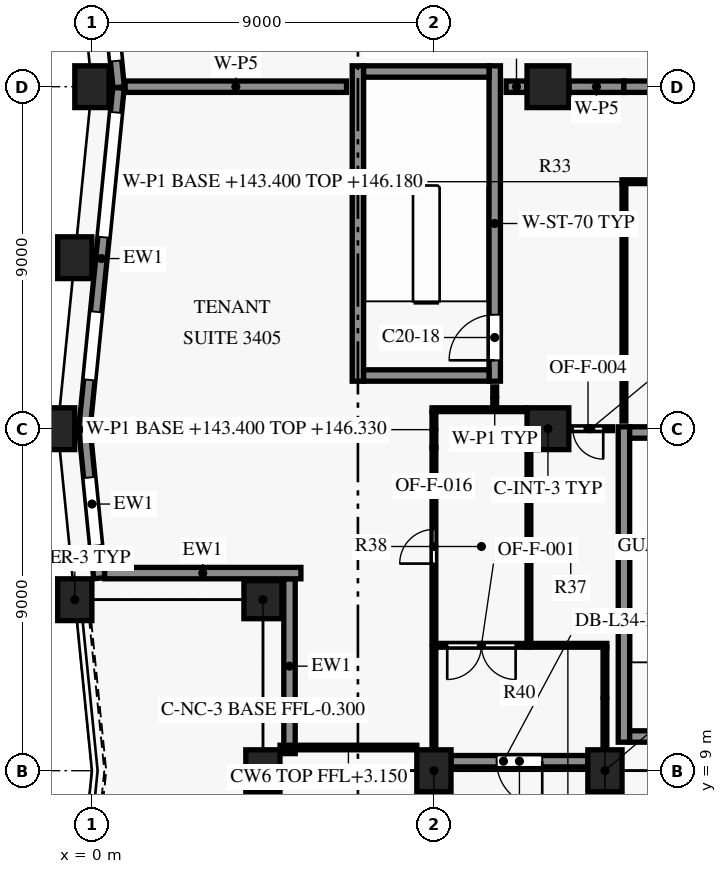
"""IFC4 building model, lengths in metres.
Left out: names, types, materials, properties, quantities, classifications, styles, units other than length and angle.
Written with IfcOpenShell. Run it as: python <this file> out.ifc"""

import sys

from ifc_helpers import new_model, si_unit, direction, frame, frame_2d, origin, origin_2d, place, context, subcontext, project, spatial, rectangle, extrude, element, fill, save


model = new_model("IFC4")
c1 = context("Model", 3, precision=1e-05, world=origin(), true_north=direction((0.0, 1.0)))
c2 = subcontext(c1, "Body", "Model", "MODEL_VIEW")
j1 = project(units=[si_unit("LENGTHUNIT", "METRE"), si_unit("PLANEANGLEUNIT", "RADIAN")], contexts=[c1])
p1 = place(None, origin())
s1 = spatial("IfcSite", under=j1, at=p1, CompositionType="ELEMENT")
p2 = place(p1, origin())
s2 = spatial("IfcBuilding", under=s1, at=p2, CompositionType="ELEMENT")
p3 = place(p2, frame((0.0, 0.0, 143.4)))
s3 = spatial("IfcBuildingStorey", under=s2, at=p3, CompositionType="ELEMENT", Elevation=143.4)
for number, where, z_axis, x_axis in (
    (1, (4.5, 9.0, -0.3), (0.0, 0.0, 1.0), (1.0, 0.0, 0.0)),
    (2, (9.0, 9.0, -0.3), (0.0, 0.0, 1.0), (1.0, 0.0, 0.0)),
    (3, (13.5, 9.0, -0.3), (0.0, 0.0, 1.0), (1.0, 0.0, 0.0)),
):
    element("IfcColumn", number, at=place(p3, frame(where, z_axis=z_axis, x_axis=x_axis)), inside=s3, PredefinedType="COLUMN", context=c2, shape_type="SweptSolid", body=[
        extrude(rectangle(XDim=0.9, YDim=1.1, at=origin_2d()), origin(), (0.0, 0.0, 1.0), 4.1),
    ])
for number, where, z_axis, x_axis in (
    (4, (0.0, 27.0, 0.0), (0.0, 0.0, 1.0), (0.0, -1.0, 0.0)),
    (5, (-0.45, 22.5, 0.0), (0.0, 0.0, 1.0), (-0.1, -0.995, 0.0)),
    (6, (-0.9, 18.0, 0.0), (0.0, 0.0, 1.0), (0.0, -1.0, 0.0)),
    (7, (-0.45, 13.5, 0.0), (0.0, 0.0, 1.0), (0.1, -0.995, 0.0)),
):
    element("IfcColumn", number, at=place(p3, frame(where, z_axis=z_axis, x_axis=x_axis)), inside=s3, PredefinedType="COLUMN", context=c2, shape_type="SweptSolid", body=[
        extrude(rectangle(XDim=0.9, YDim=1.1, at=origin_2d()), origin(), (0.0, 0.0, 1.0), 3.8),
    ])
p4 = place(p3, frame((4.5, 13.5, -0.3), z_axis=(0.0, 0.0, 1.0), x_axis=(1.0, 0.0, 0.0)))
e8 = element("IfcColumn", 8, at=p4, inside=s3, PredefinedType="COLUMN", context=c2, shape_type="SweptSolid", body=[
    extrude(rectangle(XDim=1.0, YDim=1.0, at=origin_2d()), origin(), (0.0, 0.0, 1.0), 4.1),
])
for number, where, z_axis, x_axis in (
    (9, (12.0, 18.0, 0.0), (0.0, 0.0, 1.0), (1.0, 0.0, 0.0)),
    (10, (12.0, 27.0, 0.0), (0.0, 0.0, 1.0), (1.0, 0.0, 0.0)),
):
    element("IfcColumn", number, at=place(p3, frame(where, z_axis=z_axis, x_axis=x_axis)), inside=s3, PredefinedType="COLUMN", context=c2, shape_type="SweptSolid", body=[
        extrude(rectangle(XDim=1.1, YDim=1.1, at=origin_2d()), origin(), (0.0, 0.0, 1.0), 3.8),
    ])
p5 = place(p3, frame((0.705, 26.985, 0.0), z_axis=(0.0, 0.0, 1.0), x_axis=(-0.099533329093, 0.995034228758, 0.0)))
e11 = element("IfcWall", 11, at=p5, inside=s3, PredefinedType="SOLIDWALL", context=c2, shape_type="SweptSolid", body=[
    extrude(rectangle(XDim=8.98, YDim=0.3, at=frame_2d((4.49, 0.0))), origin(), (0.0, 0.0, 1.0), 3.15),
])
p6 = place(p5, frame((0.696, 0.0, 0.15)))
e12 = element("IfcOpeningElement", 12, at=p6, cuts=e11, PredefinedType="OPENING", context=c2, shape_type="SweptSolid", body=[
    extrude(rectangle(XDim=3.3, YDim=2.4, at=frame_2d((1.65, 1.2))), frame((0.0, 0.16, 0.0), z_axis=(0.0, -1.0, 0.0), x_axis=(1.0, 0.0, 0.0)), (0.0, 0.0, 1.0), 0.32),
])
p7 = place(p5, frame((5.969, 0.0, 0.75)))
e13 = element("IfcOpeningElement", 13, at=p7, cuts=e11, PredefinedType="OPENING", context=c2, shape_type="SweptSolid", body=[
    extrude(rectangle(XDim=1.8, YDim=1.8, at=frame_2d((0.9, 0.9))), frame((0.0, 0.16, 0.0), z_axis=(0.0, -1.0, 0.0), x_axis=(1.0, 0.0, 0.0)), (0.0, 0.0, 1.0), 0.32),
])
p8 = place(p3, frame((-0.198, 17.985, 0.0), z_axis=(0.0, 0.0, 1.0), x_axis=(0.099495688264, 0.995037993253, 0.0)))
e14 = element("IfcWall", 14, at=p8, inside=s3, PredefinedType="SOLIDWALL", context=c2, shape_type="SweptSolid", body=[
    extrude(rectangle(XDim=9.03, YDim=0.3, at=frame_2d((4.515, 0.0))), origin(), (0.0, 0.0, 1.0), 3.15),
])
p9 = place(p8, frame((1.306, 0.0, 0.75)))
e15 = element("IfcOpeningElement", 15, at=p9, cuts=e14, PredefinedType="OPENING", context=c2, shape_type="SweptSolid", body=[
    extrude(rectangle(XDim=1.8, YDim=1.8, at=frame_2d((0.9, 0.9))), frame((0.0, 0.16, 0.0), z_axis=(0.0, -1.0, 0.0), x_axis=(1.0, 0.0, 0.0)), (0.0, 0.0, 1.0), 0.32),
])
p10 = place(p8, frame((5.079, 0.0, 0.15)))
e16 = element("IfcOpeningElement", 16, at=p10, cuts=e14, PredefinedType="OPENING", context=c2, shape_type="SweptSolid", body=[
    extrude(rectangle(XDim=3.3, YDim=2.4, at=frame_2d((1.65, 1.2))), frame((0.0, 0.16, 0.0), z_axis=(0.0, -1.0, 0.0), x_axis=(1.0, 0.0, 0.0)), (0.0, 0.0, 1.0), 0.32),
])
p11 = place(p3, frame((0.197, 14.065, 0.0), z_axis=(0.0, 0.0, 1.0), x_axis=(-0.099528354722, 0.995034726332, 0.0)))
e17 = element("IfcWall", 17, at=p11, inside=s3, PredefinedType="SOLIDWALL", context=c2, shape_type="SweptSolid", body=[
    extrude(rectangle(XDim=3.925, YDim=0.3, at=frame_2d((1.962, 0.0))), origin(), (0.0, 0.0, 1.0), 3.15),
])
p12 = place(p11, frame((0.864, 0.0, 0.75)))
e18 = element("IfcOpeningElement", 18, at=p12, cuts=e17, PredefinedType="OPENING", context=c2, shape_type="SweptSolid", body=[
    extrude(rectangle(XDim=1.8, YDim=1.8, at=frame_2d((0.9, 0.9))), frame((0.0, 0.16, 0.0), z_axis=(0.0, -1.0, 0.0), x_axis=(1.0, 0.0, 0.0)), (0.0, 0.0, 1.0), 0.32),
])
p13 = place(p3, frame((5.5, 14.2, 0.0), z_axis=(0.0, 0.0, 1.0), x_axis=(-1.0, 0.0, 0.0)))
e19 = element("IfcWall", 19, at=p13, inside=s3, PredefinedType="SOLIDWALL", context=c2, shape_type="SweptSolid", body=[
    extrude(rectangle(XDim=5.165, YDim=0.3, at=frame_2d((2.582, 0.0))), origin(), (0.0, 0.0, 1.0), 3.15),
])
p14 = place(p3, frame((5.2, 9.45, 0.0), z_axis=(0.0, 0.0, 1.0), x_axis=(0.0, 1.0, 0.0)))
e20 = element("IfcWall", 20, at=p14, inside=s3, PredefinedType="SOLIDWALL", context=c2, shape_type="SweptSolid", body=[
    extrude(rectangle(XDim=4.602, YDim=0.3, at=frame_2d((2.301, 0.0))), origin(), (0.0, 0.0, 1.0), 3.15),
])
p15 = place(p3, frame((13.05, 9.25, 0.0), z_axis=(0.0, 0.0, 1.0), x_axis=(-1.0, 0.0, 0.0)))
e21 = element("IfcWall", 21, at=p15, inside=s3, PredefinedType="SOLIDWALL", context=c2, shape_type="SweptSolid", body=[
    extrude(rectangle(XDim=3.6, YDim=0.3, at=frame_2d((1.8, 0.0))), origin(), (0.0, 0.0, 1.0), 3.15),
])
p16 = place(p15, frame((1.2, 0.0, 0.0)))
e22 = element("IfcOpeningElement", 22, at=p16, cuts=e21, PredefinedType="OPENING", context=c2, shape_type="SweptSolid", body=[
    extrude(rectangle(XDim=1.2, YDim=2.5, at=frame_2d((0.6, 1.25))), frame((0.0, 0.16, 0.0), z_axis=(0.0, -1.0, 0.0), x_axis=(1.0, 0.0, 0.0)), (0.0, 0.0, 1.0), 0.32),
])
for number, where, z_axis, x_axis in (
    (23, (14.15, 9.9, 0.0), (0.0, 0.0, 1.0), (1.0, 0.0, 0.0)),
    (24, (14.15, 17.9, 0.0), (0.0, 0.0, 1.0), (1.0, 0.0, 0.0)),
    (25, (7.15, 19.4, 0.0), (0.0, 0.0, 1.0), (1.0, 0.0, 0.0)),
    (26, (7.15, 27.4, 0.0), (0.0, 0.0, 1.0), (1.0, 0.0, 0.0)),
):
    element("IfcWall", number, at=place(p3, frame(where, z_axis=z_axis, x_axis=x_axis)), inside=s3, PredefinedType="SHEAR", context=c2, shape_type="SweptSolid", body=[
        extrude(rectangle(XDim=3.3, YDim=0.3, at=frame_2d((1.65, 0.0))), origin(), (0.0, 0.0, 1.0), 3.5),
    ])
p17 = place(p3, frame((7.0, 19.25, 0.0), z_axis=(0.0, 0.0, 1.0), x_axis=(0.0, 1.0, 0.0)))
e27 = element("IfcWall", 27, at=p17, inside=s3, PredefinedType="SHEAR", context=c2, shape_type="SweptSolid", body=[
    extrude(rectangle(XDim=8.3, YDim=0.3, at=frame_2d((4.15, 0.0))), origin(), (0.0, 0.0, 1.0), 3.5),
])
p18 = place(p3, frame((10.6, 19.25, 0.0), z_axis=(0.0, 0.0, 1.0), x_axis=(0.0, 1.0, 0.0)))
e28 = element("IfcWall", 28, at=p18, inside=s3, PredefinedType="SHEAR", context=c2, shape_type="SweptSolid", body=[
    extrude(rectangle(XDim=8.3, YDim=0.3, at=frame_2d((4.15, 0.0))), origin(), (0.0, 0.0, 1.0), 3.5),
])
p19 = place(p18, frame((0.55, 0.0, 0.0)))
e29 = element("IfcOpeningElement", 29, at=p19, cuts=e28, PredefinedType="OPENING", context=c2, shape_type="SweptSolid", body=[
    extrude(rectangle(XDim=1.2, YDim=2.2, at=frame_2d((0.6, 1.1))), frame((0.0, 0.16, 0.0), z_axis=(0.0, -1.0, 0.0), x_axis=(1.0, 0.0, 0.0)), (0.0, 0.0, 1.0), 0.32),
])
p20 = place(p3, frame((14.0, 9.75, 0.0), z_axis=(0.0, 0.0, 1.0), x_axis=(0.0, 1.0, 0.0)))
e30 = element("IfcWall", 30, at=p20, inside=s3, PredefinedType="SHEAR", context=c2, shape_type="SweptSolid", body=[
    extrude(rectangle(XDim=8.3, YDim=0.3, at=frame_2d((4.15, 0.0))), origin(), (0.0, 0.0, 1.0), 3.5),
])
p21 = place(p3, frame((9.0, 9.57, 0.0), z_axis=(0.0, 0.0, 1.0), x_axis=(0.0, 1.0, 0.0)))
e31 = element("IfcWall", 31, at=p21, inside=s3, PredefinedType="PARTITIONING", context=c2, shape_type="SweptSolid", body=[
    extrude(rectangle(XDim=2.68, YDim=0.1, at=frame_2d((1.34, 0.0))), origin(), (0.0, 0.0, 1.0), 3.48),
])
p22 = place(p3, frame((13.5, 12.25, 0.0), z_axis=(0.0, 0.0, 1.0), x_axis=(0.0, -1.0, 0.0)))
e32 = element("IfcWall", 32, at=p22, inside=s3, PredefinedType="PARTITIONING", context=c2, shape_type="SweptSolid", body=[
    extrude(rectangle(XDim=2.68, YDim=0.1, at=frame_2d((1.34, 0.0))), origin(), (0.0, 0.0, 1.0), 2.78),
])
p23 = place(p3, frame((11.5, 12.3, 0.0), z_axis=(0.0, 0.0, 1.0), x_axis=(-1.0, 0.0, 0.0)))
e33 = element("IfcWall", 33, at=p23, inside=s3, PredefinedType="PARTITIONING", context=c2, shape_type="SweptSolid", body=[
    extrude(rectangle(XDim=2.45, YDim=0.1, at=frame_2d((1.225, 0.0))), origin(), (0.0, 0.0, 1.0), 3.48),
])
p24 = place(p23, frame((0.35, 0.0, 0.0)))
e34 = element("IfcOpeningElement", 34, at=p24, cuts=e33, PredefinedType="OPENING", context=c2, shape_type="SweptSolid", body=[
    extrude(rectangle(XDim=1.8, YDim=2.1, at=frame_2d((0.9, 1.05))), frame((0.0, 0.06, 0.0), z_axis=(0.0, -1.0, 0.0), x_axis=(1.0, 0.0, 0.0)), (0.0, 0.0, 1.0), 0.12),
])
p25 = place(p3, frame((11.5, 12.3, 0.0), z_axis=(0.0, 0.0, 1.0), x_axis=(1.0, 0.0, 0.0)))
e35 = element("IfcWall", 35, at=p25, inside=s3, PredefinedType="PARTITIONING", context=c2, shape_type="SweptSolid", body=[
    extrude(rectangle(XDim=2.05, YDim=0.1, at=frame_2d((1.025, 0.0))), origin(), (0.0, 0.0, 1.0), 2.78),
])
p26 = place(p3, frame((9.0, 12.35, 0.0), z_axis=(0.0, 0.0, 1.0), x_axis=(0.0, 1.0, 0.0)))
e36 = element("IfcWall", 36, at=p26, inside=s3, PredefinedType="PARTITIONING", context=c2, shape_type="SweptSolid", body=[
    extrude(rectangle(XDim=5.15, YDim=0.1, at=frame_2d((2.575, 0.0))), origin(), (0.0, 0.0, 1.0), 3.48),
])
p27 = place(p26, frame((2.1, 0.0, 0.0)))
e37 = element("IfcOpeningElement", 37, at=p27, cuts=e36, PredefinedType="OPENING", context=c2, shape_type="SweptSolid", body=[
    extrude(rectangle(XDim=0.9, YDim=2.1, at=frame_2d((0.45, 1.05))), frame((0.0, 0.06, 0.0), z_axis=(0.0, -1.0, 0.0), x_axis=(1.0, 0.0, 0.0)), (0.0, 0.0, 1.0), 0.12),
])
p28 = place(p3, frame((11.5, 17.445, 0.0), z_axis=(0.0, 0.0, 1.0), x_axis=(0.0, -1.0, 0.0)))
e38 = element("IfcWall", 38, at=p28, inside=s3, PredefinedType="PARTITIONING", context=c2, shape_type="SweptSolid", body=[
    extrude(rectangle(XDim=5.095, YDim=0.1, at=frame_2d((2.547, 0.0))), origin(), (0.0, 0.0, 1.0), 3.48),
])
p29 = place(p3, frame((9.0, 17.5, 0.0), z_axis=(0.0, 0.0, 1.0), x_axis=(0.0, 1.0, 0.0)))
e39 = element("IfcWall", 39, at=p29, inside=s3, PredefinedType="PARTITIONING", context=c2, shape_type="SweptSolid", body=[
    extrude(rectangle(XDim=0.95, YDim=0.1, at=frame_2d((0.475, 0.0))), origin(), (0.0, 0.0, 1.0), 2.93),
])
p30 = place(p3, frame((13.7, 18.0, 0.0), z_axis=(0.0, 0.0, 1.0), x_axis=(-1.0, 0.0, 0.0)))
e40 = element("IfcWall", 40, at=p30, inside=s3, PredefinedType="PARTITIONING", context=c2, shape_type="SweptSolid", body=[
    extrude(rectangle(XDim=1.145, YDim=0.1, at=frame_2d((0.573, 0.0))), origin(), (0.0, 0.0, 1.0), 2.78),
])
p31 = place(p30, frame((0.245, 0.0, 0.0)))
e41 = element("IfcOpeningElement", 41, at=p31, cuts=e40, PredefinedType="OPENING", context=c2, shape_type="SweptSolid", body=[
    extrude(rectangle(XDim=0.8, YDim=2.1, at=frame_2d((0.4, 1.05))), frame((0.0, 0.06, 0.0), z_axis=(0.0, -1.0, 0.0), x_axis=(1.0, 0.0, 0.0)), (0.0, 0.0, 1.0), 0.12),
])
p32 = place(p3, frame((8.95, 18.5, 0.0), z_axis=(0.0, 0.0, 1.0), x_axis=(1.0, 0.0, 0.0)))
e42 = element("IfcWall", 42, at=p32, inside=s3, PredefinedType="PARTITIONING", context=c2, shape_type="SweptSolid", body=[
    extrude(rectangle(XDim=2.48, YDim=0.1, at=frame_2d((1.24, 0.0))), origin(), (0.0, 0.0, 1.0), 3.48),
])
p33 = place(p3, frame((10.6, 18.55, 0.0), z_axis=(0.0, 0.0, 1.0), x_axis=(0.0, 1.0, 0.0)))
e43 = element("IfcWall", 43, at=p33, inside=s3, PredefinedType="PARTITIONING", context=c2, shape_type="SweptSolid", body=[
    extrude(rectangle(XDim=0.55, YDim=0.1, at=frame_2d((0.275, 0.0))), origin(), (0.0, 0.0, 1.0), 3.48),
])
p34 = place(p3, frame((14.0, 24.45, 0.0), z_axis=(0.0, 0.0, 1.0), x_axis=(0.0, -1.0, 0.0)))
e44 = element("IfcWall", 44, at=p34, inside=s3, PredefinedType="PARTITIONING", context=c2, shape_type="SweptSolid", body=[
    extrude(rectangle(XDim=6.25, YDim=0.1, at=frame_2d((3.125, 0.0))), origin(), (0.0, 0.0, 1.0), 3.48),
])
p35 = place(p3, frame((17.95, 24.5, 0.0), z_axis=(0.0, 0.0, 1.0), x_axis=(-1.0, 0.0, 0.0)))
e45 = element("IfcWall", 45, at=p35, inside=s3, PredefinedType="PARTITIONING", context=c2, shape_type="SweptSolid", body=[
    extrude(rectangle(XDim=4.0, YDim=0.1, at=frame_2d((2.0, 0.0))), origin(), (0.0, 0.0, 1.0), 2.78),
])
p36 = place(p3, frame((0.874, 27.0, 0.0), z_axis=(0.0, 0.0, 1.0), x_axis=(1.0, 0.0, 0.0)))
e46 = element("IfcWall", 46, at=p36, inside=s3, PredefinedType="PARTITIONING", context=c2, shape_type="SweptSolid", body=[
    extrude(rectangle(XDim=5.826, YDim=0.3, at=frame_2d((2.913, 0.0))), origin(), (0.0, 0.0, 1.0), 2.78),
])
p37 = place(p3, frame((10.9, 27.0, 0.0), z_axis=(0.0, 0.0, 1.0), x_axis=(1.0, 0.0, 0.0)))
e47 = element("IfcWall", 47, at=p37, inside=s3, PredefinedType="PARTITIONING", context=c2, shape_type="SweptSolid", body=[
    extrude(rectangle(XDim=0.545, YDim=0.3, at=frame_2d((0.272, 0.0))), origin(), (0.0, 0.0, 1.0), 3.48),
])
p38 = place(p3, frame((12.555, 27.0, 0.0), z_axis=(0.0, 0.0, 1.0), x_axis=(1.0, 0.0, 0.0)))
e48 = element("IfcWall", 48, at=p38, inside=s3, PredefinedType="PARTITIONING", context=c2, shape_type="SweptSolid", body=[
    extrude(rectangle(XDim=1.445, YDim=0.3, at=frame_2d((0.723, 0.0))), origin(), (0.0, 0.0, 1.0), 2.78),
])
p39 = place(p3, frame((14.0, 27.0, 0.0), z_axis=(0.0, 0.0, 1.0), x_axis=(1.0, 0.0, 0.0)))
e49 = element("IfcWall", 49, at=p39, inside=s3, PredefinedType="PARTITIONING", context=c2, shape_type="SweptSolid", body=[
    extrude(rectangle(XDim=3.9, YDim=0.3, at=frame_2d((1.95, 0.0))), origin(), (0.0, 0.0, 1.0), 2.78),
])
p40 = place(p6, origin())
e50 = element("IfcWindow", 50, at=p40, inside=s3, PartitioningType="SINGLE_PANEL", PredefinedType="WINDOW", context=c2, shape_type="SweptSolid", body=[
    extrude(rectangle(XDim=3.3, YDim=2.4, at=frame_2d((1.65, 1.2))), frame((0.0, 0.03, 0.0), z_axis=(0.0, -1.0, 0.0), x_axis=(1.0, 0.0, 0.0)), (0.0, 0.0, 1.0), 0.06),
])
fill(e12, e50)
p41 = place(p9, origin())
e51 = element("IfcWindow", 51, at=p41, inside=s3, PartitioningType="SINGLE_PANEL", PredefinedType="WINDOW", context=c2, shape_type="SweptSolid", body=[
    extrude(rectangle(XDim=1.8, YDim=1.8, at=frame_2d((0.9, 0.9))), frame((0.0, 0.03, 0.0), z_axis=(0.0, -1.0, 0.0), x_axis=(1.0, 0.0, 0.0)), (0.0, 0.0, 1.0), 0.06),
])
fill(e15, e51)
p42 = place(p10, origin())
e52 = element("IfcWindow", 52, at=p42, inside=s3, PartitioningType="SINGLE_PANEL", PredefinedType="WINDOW", context=c2, shape_type="SweptSolid", body=[
    extrude(rectangle(XDim=3.3, YDim=2.4, at=frame_2d((1.65, 1.2))), frame((0.0, 0.03, 0.0), z_axis=(0.0, -1.0, 0.0), x_axis=(1.0, 0.0, 0.0)), (0.0, 0.0, 1.0), 0.06),
])
fill(e16, e52)
p43 = place(p12, origin())
e53 = element("IfcWindow", 53, at=p43, inside=s3, PartitioningType="SINGLE_PANEL", PredefinedType="WINDOW", context=c2, shape_type="SweptSolid", body=[
    extrude(rectangle(XDim=1.8, YDim=1.8, at=frame_2d((0.9, 0.9))), frame((0.0, 0.03, 0.0), z_axis=(0.0, -1.0, 0.0), x_axis=(1.0, 0.0, 0.0)), (0.0, 0.0, 1.0), 0.06),
])
fill(e18, e53)
p44 = place(p16, origin())
e54 = element("IfcDoor", 54, at=p44, inside=s3, OperationType="SINGLE_SWING_LEFT", PredefinedType="DOOR", context=c2, shape_type="SweptSolid", body=[
    extrude(rectangle(XDim=1.2, YDim=2.5, at=frame_2d((0.6, 1.25))), frame((0.0, 0.025, 0.0), z_axis=(0.0, -1.0, 0.0), x_axis=(1.0, 0.0, 0.0)), (0.0, 0.0, 1.0), 0.05),
])
fill(e22, e54)
p45 = place(p19, origin())
e55 = element("IfcDoor", 55, at=p45, inside=s3, OperationType="SINGLE_SWING_RIGHT", PredefinedType="DOOR", context=c2, shape_type="SweptSolid", body=[
    extrude(rectangle(XDim=1.2, YDim=2.2, at=frame_2d((0.6, 1.1))), frame((0.0, 0.025, 0.0), z_axis=(0.0, -1.0, 0.0), x_axis=(1.0, 0.0, 0.0)), (0.0, 0.0, 1.0), 0.05),
])
fill(e29, e55)
p46 = place(p24, origin())
e56 = element("IfcDoor", 56, at=p46, inside=s3, OperationType="DOUBLE_DOOR_SINGLE_SWING", PredefinedType="DOOR", context=c2, shape_type="SweptSolid", body=[
    extrude(rectangle(XDim=1.8, YDim=2.1, at=frame_2d((0.9, 1.05))), frame((0.0, 0.025, 0.0), z_axis=(0.0, -1.0, 0.0), x_axis=(1.0, 0.0, 0.0)), (0.0, 0.0, 1.0), 0.05),
])
fill(e34, e56)
p47 = place(p31, origin())
e57 = element("IfcDoor", 57, at=p47, inside=s3, OperationType="SINGLE_SWING_LEFT", PredefinedType="DOOR", context=c2, shape_type="SweptSolid", body=[
    extrude(rectangle(XDim=0.8, YDim=2.1, at=frame_2d((0.4, 1.05))), frame((0.0, 0.025, 0.0), z_axis=(0.0, -1.0, 0.0), x_axis=(1.0, 0.0, 0.0)), (0.0, 0.0, 1.0), 0.05),
])
fill(e41, e57)
p48 = place(p27, origin())
e58 = element("IfcDoor", 58, at=p48, inside=s3, OperationType="SINGLE_SWING_RIGHT", PredefinedType="DOOR", context=c2, shape_type="SweptSolid", body=[
    extrude(rectangle(XDim=0.9, YDim=2.1, at=frame_2d((0.45, 1.05))), frame((0.0, 0.025, 0.0), z_axis=(0.0, -1.0, 0.0), x_axis=(1.0, 0.0, 0.0)), (0.0, 0.0, 1.0), 0.05),
])
fill(e37, e58)
save(model, sys.argv[1])
